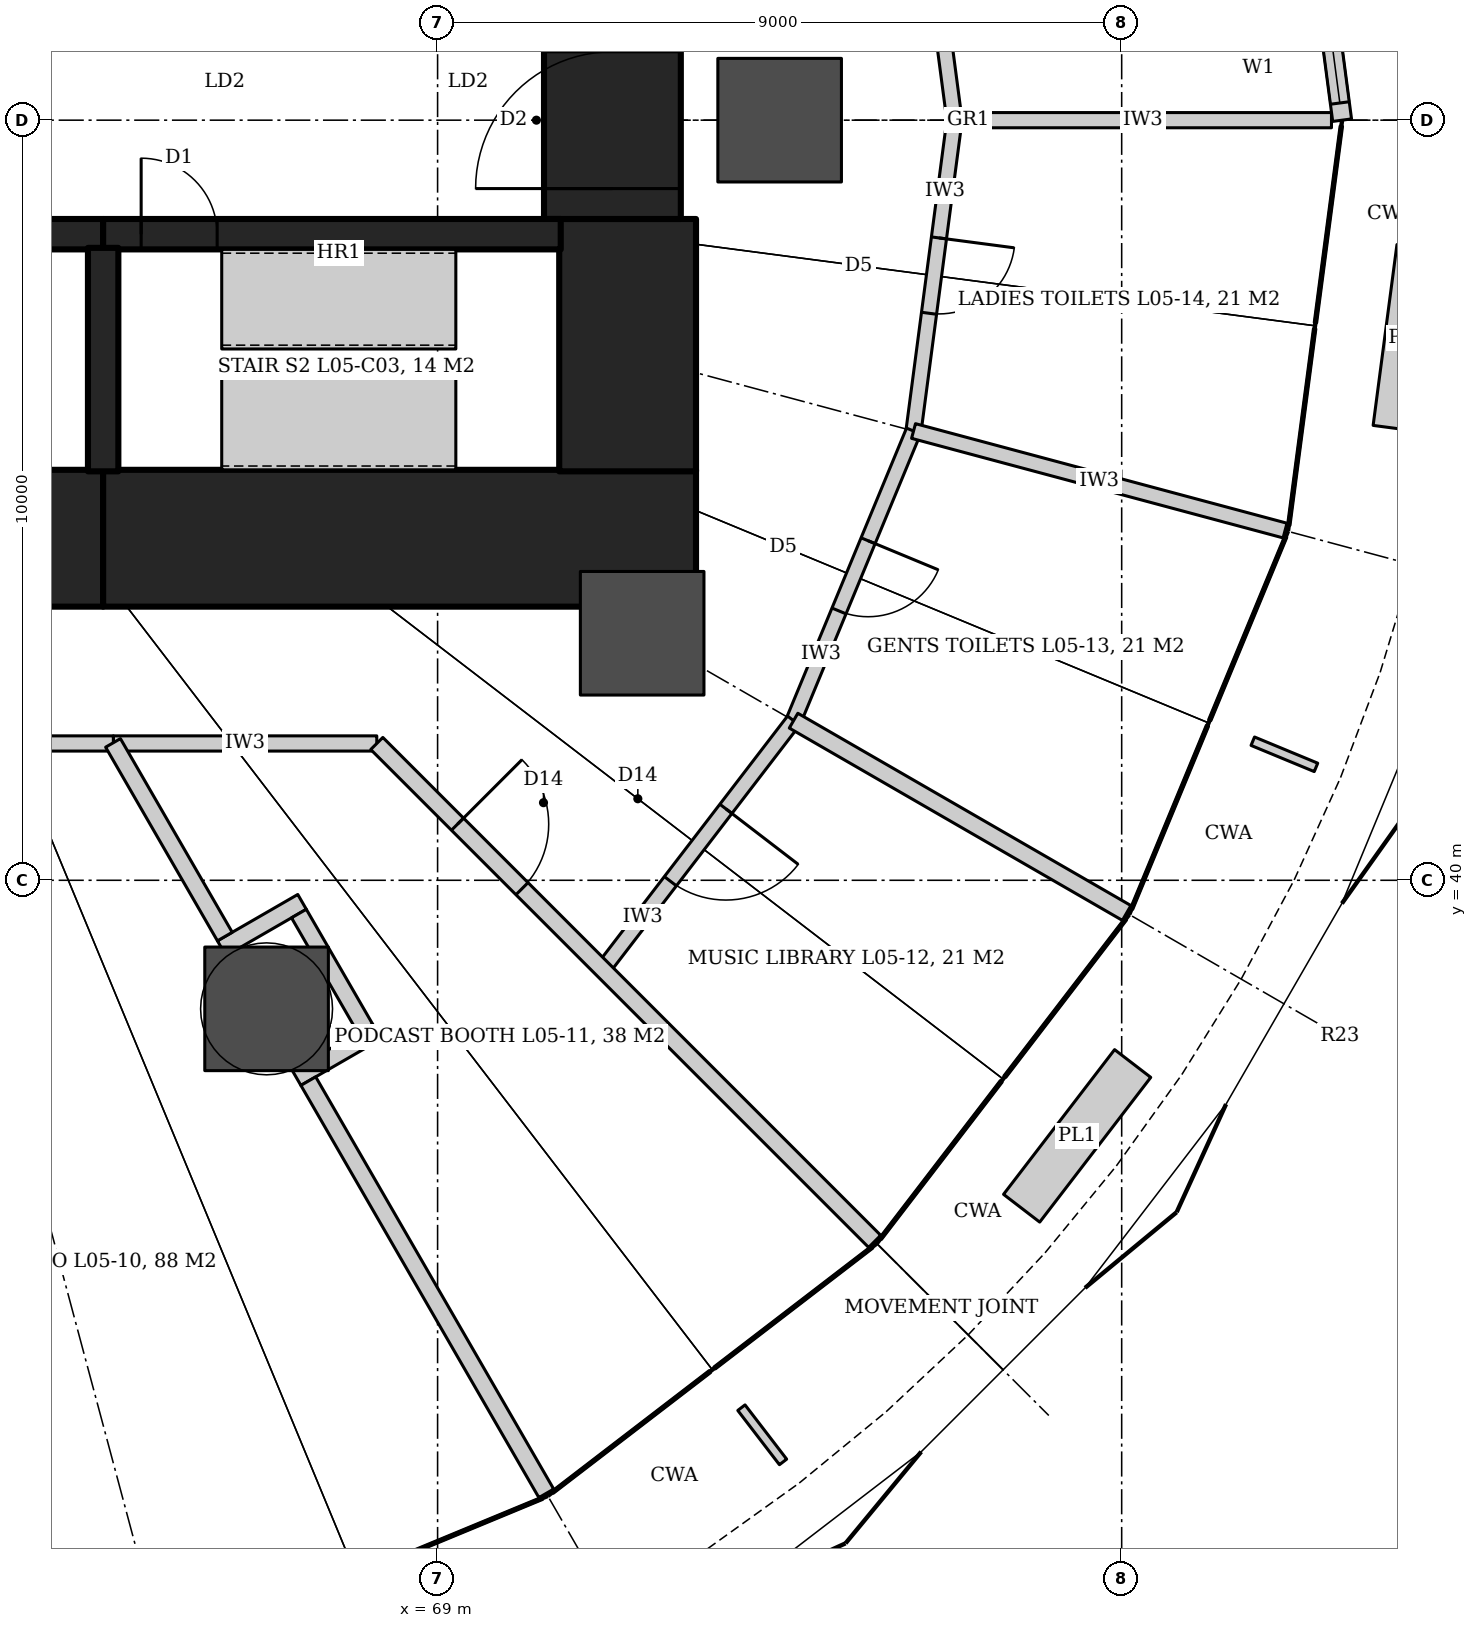
"""IFC4 building model, lengths in metres.
Left out: names, types, materials, properties, quantities, classifications, styles, units other than length and angle.
Written with IfcOpenShell. Run it as: python <this file> out.ifc"""

import sys

from ifc_helpers import new_model, si_unit, direction, frame, frame_2d, origin, origin_2d, place, context, subcontext, project, spatial, rectangle, hollow_circle, extrude, element, fill, save


model = new_model("IFC4")
c1 = context("Model", 3, precision=1e-05, world=origin(), true_north=direction((0.0, 1.0)))
c2 = subcontext(c1, "Body", "Model", "MODEL_VIEW")
j1 = project(units=[si_unit("LENGTHUNIT", "METRE"), si_unit("PLANEANGLEUNIT", "RADIAN")], contexts=[c1])
p1 = place(None, origin())
s1 = spatial("IfcSite", under=j1, at=p1, CompositionType="ELEMENT")
p2 = place(p1, origin())
s2 = spatial("IfcBuilding", under=s1, at=p2, CompositionType="ELEMENT")
p3 = place(p2, frame((0.0, 0.0, 30.2)))
s3 = spatial("IfcBuildingStorey", under=s2, at=p3, CompositionType="ELEMENT", Elevation=30.2)
p4 = place(p3, frame((55.4, 44.5, 0.0), z_axis=(0.0, 0.0, 1.0), x_axis=(1.0, 0.0, 0.0)))
e1 = element("IfcWall", 1, at=p4, inside=s3, PredefinedType="SHEAR", context=c2, shape_type="SweptSolid", body=[
    extrude(rectangle(XDim=9.2, YDim=1.8, at=frame_2d((4.6, 0.0))), origin(), (0.0, 0.0, 1.0), 4.2),
])
p5 = place(p3, frame((64.6, 44.5, 0.0), z_axis=(0.0, 0.0, 1.0), x_axis=(1.0, 0.0, 0.0)))
e2 = element("IfcWall", 2, at=p5, inside=s3, PredefinedType="SHEAR", context=c2, shape_type="SweptSolid", body=[
    extrude(rectangle(XDim=7.8, YDim=1.8, at=frame_2d((3.9, 0.0))), origin(), (0.0, 0.0, 1.0), 4.2),
])
p6 = place(p3, frame((71.5, 45.38, 0.0), z_axis=(0.0, 0.0, 1.0), x_axis=(0.0, 1.0, 0.0)))
e3 = element("IfcWall", 3, at=p6, inside=s3, PredefinedType="SHEAR", context=c2, shape_type="SweptSolid", body=[
    extrude(rectangle(XDim=3.32, YDim=1.8, at=frame_2d((1.66, 0.0))), origin(), (0.0, 0.0, 1.0), 4.2),
])
p7 = place(p3, frame((71.3, 48.7, 0.0), z_axis=(0.0, 0.0, 1.0), x_axis=(0.0, 1.0, 0.0)))
e4 = element("IfcWall", 4, at=p7, inside=s3, PredefinedType="SHEAR", context=c2, shape_type="SweptSolid", body=[
    extrude(rectangle(XDim=2.6, YDim=1.8, at=frame_2d((1.3, 0.0))), origin(), (0.0, 0.0, 1.0), 4.2),
])
p8 = place(p7, frame((0.4, 0.0, 0.0)))
e5 = element("IfcOpeningElement", 5, at=p8, cuts=e4, PredefinedType="OPENING", context=c2, shape_type="SweptSolid", body=[
    extrude(rectangle(XDim=1.8, YDim=2.1, at=frame_2d((0.9, 1.05))), frame((0.0, 0.91, 0.0), z_axis=(0.0, -1.0, 0.0), x_axis=(1.0, 0.0, 0.0)), (0.0, 0.0, 1.0), 1.82),
])
p9 = place(p3, frame((55.4, 48.5, 0.0), z_axis=(0.0, 0.0, 1.0), x_axis=(1.0, 0.0, 0.0)))
e6 = element("IfcWall", 6, at=p9, inside=s3, PredefinedType="SHEAR", context=c2, shape_type="SweptSolid", body=[
    extrude(rectangle(XDim=9.2, YDim=0.4, at=frame_2d((4.6, 0.0))), origin(), (0.0, 0.0, 1.0), 4.2),
])
p10 = place(p3, frame((64.6, 48.5, 0.0), z_axis=(0.0, 0.0, 1.0), x_axis=(1.0, 0.0, 0.0)))
e7 = element("IfcWall", 7, at=p10, inside=s3, PredefinedType="SHEAR", context=c2, shape_type="SweptSolid", body=[
    extrude(rectangle(XDim=6.02, YDim=0.4, at=frame_2d((3.01, 0.0))), origin(), (0.0, 0.0, 1.0), 4.2),
])
p11 = place(p10, frame((0.5, 0.0, 0.0)))
e8 = element("IfcOpeningElement", 8, at=p11, cuts=e7, PredefinedType="OPENING", context=c2, shape_type="SweptSolid", body=[
    extrude(rectangle(XDim=1.0, YDim=2.1, at=frame_2d((0.5, 1.05))), frame((0.0, 0.21, 0.0), z_axis=(0.0, -1.0, 0.0), x_axis=(1.0, 0.0, 0.0)), (0.0, 0.0, 1.0), 0.42),
])
p12 = place(p3, frame((64.6, 48.32, 0.0), z_axis=(0.0, 0.0, 1.0), x_axis=(0.0, -1.0, 0.0)))
e9 = element("IfcWall", 9, at=p12, inside=s3, PredefinedType="SHEAR", context=c2, shape_type="SweptSolid", body=[
    extrude(rectangle(XDim=2.94, YDim=0.4, at=frame_2d((1.47, 0.0))), origin(), (0.0, 0.0, 1.0), 4.2),
])
for number, where, z_axis, x_axis in (
    (10, (73.5, 50.0, 0.0), (0.0, 0.0, 1.0), (1.0, 0.0, 0.0)),
    (11, (66.75, 38.309, 0.0), (0.0, 0.0, 1.0), (1.0, 0.0, 0.0)),
    (12, (71.691, 43.25, 0.0), (0.0, 0.0, 1.0), (1.0, 0.0, 0.0)),
):
    element("IfcColumn", number, at=place(p3, frame(where, z_axis=z_axis, x_axis=x_axis)), inside=s3, PredefinedType="COLUMN", context=c2, shape_type="SweptSolid", body=[
        extrude(hollow_circle(Radius=0.813, WallThickness=0.08, at=origin_2d()), origin(), (0.0, 0.0, 1.0), 4.2),
    ])
p13 = place(p3, frame((75.262, 54.089, 0.0), z_axis=(0.0, 0.0, 1.0), x_axis=(0.130515758099, -0.991446234996, 0.0)))
e13 = element("IfcWall", 13, at=p13, inside=s3, PredefinedType="PARTITIONING", context=c2, shape_type="SweptSolid", body=[
    extrude(rectangle(XDim=4.125, YDim=0.2, at=frame_2d((2.062, 0.0))), origin(), (0.0, 0.0, 1.0), 3.04),
])
p14 = place(p3, frame((75.8, 50.0, 0.0), z_axis=(0.0, 0.0, 1.0), x_axis=(-0.130515758099, -0.991446234996, 0.0)))
e14 = element("IfcWall", 14, at=p14, inside=s3, PredefinedType="PARTITIONING", context=c2, shape_type="SweptSolid", body=[
    extrude(rectangle(XDim=4.125, YDim=0.2, at=frame_2d((2.062, 0.0))), origin(), (0.0, 0.0, 1.0), 3.04),
])
p15 = place(p14, frame((1.562, 0.0, 0.0)))
e15 = element("IfcOpeningElement", 15, at=p15, cuts=e14, PredefinedType="OPENING", context=c2, shape_type="SweptSolid", body=[
    extrude(rectangle(XDim=1.0, YDim=2.1, at=frame_2d((0.5, 1.05))), frame((0.0, 0.11, 0.0), z_axis=(0.0, -1.0, 0.0), x_axis=(1.0, 0.0, 0.0)), (0.0, 0.0, 1.0), 0.22),
])
p16 = place(p3, frame((75.262, 45.911, 0.0), z_axis=(0.0, 0.0, 1.0), x_axis=(-0.382731667114, -0.923859551549, 0.0)))
e16 = element("IfcWall", 16, at=p16, inside=s3, PredefinedType="PARTITIONING", context=c2, shape_type="SweptSolid", body=[
    extrude(rectangle(XDim=4.125, YDim=0.2, at=frame_2d((2.062, 0.0))), origin(), (0.0, 0.0, 1.0), 3.04),
])
p17 = place(p16, frame((1.562, 0.0, 0.0)))
e17 = element("IfcOpeningElement", 17, at=p17, cuts=e16, PredefinedType="OPENING", context=c2, shape_type="SweptSolid", body=[
    extrude(rectangle(XDim=1.0, YDim=2.1, at=frame_2d((0.5, 1.05))), frame((0.0, 0.11, 0.0), z_axis=(0.0, -1.0, 0.0), x_axis=(1.0, 0.0, 0.0)), (0.0, 0.0, 1.0), 0.22),
])
p18 = place(p3, frame((73.683, 42.1, 0.0), z_axis=(0.0, 0.0, 1.0), x_axis=(-0.608714823874, -0.793389099494, 0.0)))
e18 = element("IfcWall", 18, at=p18, inside=s3, PredefinedType="PARTITIONING", context=c2, shape_type="SweptSolid", body=[
    extrude(rectangle(XDim=4.125, YDim=0.2, at=frame_2d((2.062, 0.0))), origin(), (0.0, 0.0, 1.0), 3.04),
])
p19 = place(p18, frame((1.462, 0.0, 0.0)))
e19 = element("IfcOpeningElement", 19, at=p19, cuts=e18, PredefinedType="OPENING", context=c2, shape_type="SweptSolid", body=[
    extrude(rectangle(XDim=1.2, YDim=2.4, at=frame_2d((0.6, 1.2))), frame((0.0, 0.11, 0.0), z_axis=(0.0, -1.0, 0.0), x_axis=(1.0, 0.0, 0.0)), (0.0, 0.0, 1.0), 0.22),
])
p20 = place(p3, frame((68.2, 41.8, 0.0), z_axis=(0.0, 0.0, 1.0), x_axis=(-1.0, 0.0, 0.0)))
e20 = element("IfcWall", 20, at=p20, inside=s3, PredefinedType="PARTITIONING", context=c2, shape_type="SweptSolid", body=[
    extrude(rectangle(XDim=3.466, YDim=0.2, at=frame_2d((1.733, 0.0))), origin(), (0.0, 0.0, 1.0), 3.04),
])
p21 = place(p3, frame((64.734, 41.8, 0.0), z_axis=(0.0, 0.0, 1.0), x_axis=(-1.0, 0.0, 0.0)))
e21 = element("IfcWall", 21, at=p21, inside=s3, PredefinedType="PARTITIONING", context=c2, shape_type="SweptSolid", body=[
    extrude(rectangle(XDim=4.734, YDim=0.2, at=frame_2d((2.367, 0.0))), origin(), (0.0, 0.0, 1.0), 3.04),
])
p22 = place(p21, frame((1.467, 0.0, 0.0)))
e22 = element("IfcOpeningElement", 22, at=p22, cuts=e21, PredefinedType="OPENING", context=c2, shape_type="SweptSolid", body=[
    extrude(rectangle(XDim=1.8, YDim=2.7, at=frame_2d((0.9, 1.35))), frame((0.0, 0.11, 0.0), z_axis=(0.0, -1.0, 0.0), x_axis=(1.0, 0.0, 0.0)), (0.0, 0.0, 1.0), 0.22),
])
p23 = place(p3, frame((75.8, 50.0, 0.0), z_axis=(0.0, 0.0, 1.0), x_axis=(1.0, 0.0, 0.0)))
e23 = element("IfcWall", 23, at=p23, inside=s3, PredefinedType="PARTITIONING", context=c2, shape_type="SweptSolid", body=[
    extrude(rectangle(XDim=4.96, YDim=0.2, at=frame_2d((2.48, 0.0))), origin(), (0.0, 0.0, 1.0), 3.04),
])
p24 = place(p3, frame((66.16, 39.106, 0.0), z_axis=(0.0, 0.0, 1.0), x_axis=(0.866055662726, 0.499947586314, 0.0)))
e24 = element("IfcWall", 24, at=p24, inside=s3, PredefinedType="PARTITIONING", context=c2, shape_type="SweptSolid", body=[
    extrude(rectangle(XDim=1.22, YDim=0.225, at=frame_2d((0.61, 0.0))), origin(), (0.0, 0.0, 1.0), 3.02),
])
p25 = place(p3, frame((67.145, 37.399, 0.0), z_axis=(0.0, 0.0, 1.0), x_axis=(0.866019052629, 0.500011000363, 0.0)))
e25 = element("IfcWall", 25, at=p25, inside=s3, PredefinedType="PARTITIONING", context=c2, shape_type="SweptSolid", body=[
    extrude(rectangle(XDim=1.221, YDim=0.225, at=frame_2d((0.61, 0.0))), origin(), (0.0, 0.0, 1.0), 3.02),
])
p26 = place(p3, frame((67.176, 39.562, 0.0), z_axis=(0.0, 0.0, 1.0), x_axis=(0.499988720078, -0.866031916153, 0.0)))
e26 = element("IfcWall", 26, at=p26, inside=s3, PredefinedType="PARTITIONING", context=c2, shape_type="SweptSolid", body=[
    extrude(rectangle(XDim=1.746, YDim=0.225, at=frame_2d((0.873, 0.0))), origin(), (0.0, 0.0, 1.0), 3.02),
])
p27 = place(p3, frame((64.73, 41.807, 0.0), z_axis=(0.0, 0.0, 1.0), x_axis=(0.49998584623, -0.866033575313, 0.0)))
e27 = element("IfcWall", 27, at=p27, inside=s3, PredefinedType="PARTITIONING", context=c2, shape_type="SweptSolid", body=[
    extrude(rectangle(XDim=2.942, YDim=0.225, at=frame_2d((1.471, 0.0))), origin(), (0.0, 0.0, 1.0), 3.04),
])
p28 = place(p3, frame((67.299, 37.358, 0.0), z_axis=(0.0, 0.0, 1.0), x_axis=(0.499980071345, -0.866036909293, 0.0)))
e28 = element("IfcWall", 28, at=p28, inside=s3, PredefinedType="PARTITIONING", context=c2, shape_type="SweptSolid", body=[
    extrude(rectangle(XDim=6.262, YDim=0.225, at=frame_2d((3.131, 0.0))), origin(), (0.0, 0.0, 1.0), 3.04),
])
p29 = place(p3, frame((68.2, 41.8, 0.0), z_axis=(0.0, 0.0, 1.0), x_axis=(0.707106781187, -0.707106781187, 0.0)))
e29 = element("IfcWall", 29, at=p29, inside=s3, PredefinedType="PARTITIONING", context=c2, shape_type="SweptSolid", body=[
    extrude(rectangle(XDim=9.263, YDim=0.225, at=frame_2d((4.632, 0.0))), origin(), (0.0, 0.0, 1.0), 3.02),
])
p30 = place(p29, frame((1.502, 0.0, 0.0)))
e30 = element("IfcOpeningElement", 30, at=p30, cuts=e29, PredefinedType="OPENING", context=c2, shape_type="SweptSolid", body=[
    extrude(rectangle(XDim=1.2, YDim=2.4, at=frame_2d((0.6, 1.2))), frame((0.0, 0.123, 0.0), z_axis=(0.0, -1.0, 0.0), x_axis=(1.0, 0.0, 0.0)), (0.0, 0.0, 1.0), 0.245),
])
p31 = place(p3, frame((73.683, 42.1, 0.0), z_axis=(0.0, 0.0, 1.0), x_axis=(0.866022478443, -0.500005066806, 0.0)))
e31 = element("IfcWall", 31, at=p31, inside=s3, PredefinedType="PARTITIONING", context=c2, shape_type="SweptSolid", body=[
    extrude(rectangle(XDim=5.06, YDim=0.225, at=frame_2d((2.53, 0.0))), origin(), (0.0, 0.0, 1.0), 3.04),
])
p32 = place(p3, frame((75.262, 45.911, 0.0), z_axis=(0.0, 0.0, 1.0), x_axis=(0.965926729572, -0.258815673981, 0.0)))
e32 = element("IfcWall", 32, at=p32, inside=s3, PredefinedType="PARTITIONING", context=c2, shape_type="SweptSolid", body=[
    extrude(rectangle(XDim=5.06, YDim=0.2, at=frame_2d((2.53, 0.0))), origin(), (0.0, 0.0, 1.0), 3.04),
])
p33 = place(p3, frame((80.9, 50.0, 0.0), z_axis=(0.0, 0.0, 1.0), x_axis=(-0.130525119492, 0.991445002601, 0.0)))
e33 = element("IfcWall", 33, at=p33, inside=s3, PredefinedType="SOLIDWALL", context=c2, shape_type="SweptSolid", body=[
    extrude(rectangle(XDim=5.456, YDim=0.25, at=frame_2d((2.728, 0.0))), origin(), (0.0, 0.0, 1.0), 4.04),
])
p34 = place(p33, frame((1.828, 0.0, 0.0)))
e34 = element("IfcOpeningElement", 34, at=p34, cuts=e33, PredefinedType="OPENING", context=c2, shape_type="SweptSolid", body=[
    extrude(rectangle(XDim=1.8, YDim=2.4, at=frame_2d((0.9, 1.2))), frame((0.0, 0.135, 0.0), z_axis=(0.0, -1.0, 0.0), x_axis=(1.0, 0.0, 0.0)), (0.0, 0.0, 1.0), 0.27),
])
p35 = place(p33, frame((0.228, 0.0, 0.0)))
e35 = element("IfcOpeningElement", 35, at=p35, cuts=e33, PredefinedType="OPENING", context=c2, shape_type="SweptSolid", body=[
    extrude(rectangle(XDim=1.2, YDim=2.4, at=frame_2d((0.6, 1.2))), frame((0.0, 0.135, 0.0), z_axis=(0.0, -1.0, 0.0), x_axis=(1.0, 0.0, 0.0)), (0.0, 0.0, 1.0), 0.27),
])
p36 = place(p33, frame((4.028, 0.0, 0.0)))
e36 = element("IfcOpeningElement", 36, at=p36, cuts=e33, PredefinedType="OPENING", context=c2, shape_type="SweptSolid", body=[
    extrude(rectangle(XDim=1.2, YDim=2.4, at=frame_2d((0.6, 1.2))), frame((0.0, 0.135, 0.0), z_axis=(0.0, -1.0, 0.0), x_axis=(1.0, 0.0, 0.0)), (0.0, 0.0, 1.0), 0.27),
])
p37 = place(p30, origin())
e37 = element("IfcDoor", 37, at=p37, inside=s3, OperationType="SINGLE_SWING_LEFT", PredefinedType="DOOR", context=c2, shape_type="SweptSolid", body=[
    extrude(rectangle(XDim=1.2, YDim=2.4, at=frame_2d((0.6, 1.2))), frame((0.0, 0.025, 0.0), z_axis=(0.0, -1.0, 0.0), x_axis=(1.0, 0.0, 0.0)), (0.0, 0.0, 1.0), 0.05),
])
fill(e30, e37)
p38 = place(p19, origin())
e38 = element("IfcDoor", 38, at=p38, inside=s3, OperationType="SINGLE_SWING_LEFT", PredefinedType="DOOR", context=c2, shape_type="SweptSolid", body=[
    extrude(rectangle(XDim=1.2, YDim=2.4, at=frame_2d((0.6, 1.2))), frame((0.0, 0.025, 0.0), z_axis=(0.0, -1.0, 0.0), x_axis=(1.0, 0.0, 0.0)), (0.0, 0.0, 1.0), 0.05),
])
fill(e19, e38)
p39 = place(p17, origin())
e39 = element("IfcDoor", 39, at=p39, inside=s3, OperationType="SINGLE_SWING_LEFT", PredefinedType="DOOR", context=c2, shape_type="SweptSolid", body=[
    extrude(rectangle(XDim=1.0, YDim=2.1, at=frame_2d((0.5, 1.05))), frame((0.0, 0.025, 0.0), z_axis=(0.0, -1.0, 0.0), x_axis=(1.0, 0.0, 0.0)), (0.0, 0.0, 1.0), 0.05),
])
fill(e17, e39)
p40 = place(p15, origin())
e40 = element("IfcDoor", 40, at=p40, inside=s3, OperationType="SINGLE_SWING_LEFT", PredefinedType="DOOR", context=c2, shape_type="SweptSolid", body=[
    extrude(rectangle(XDim=1.0, YDim=2.1, at=frame_2d((0.5, 1.05))), frame((0.0, 0.025, 0.0), z_axis=(0.0, -1.0, 0.0), x_axis=(1.0, 0.0, 0.0)), (0.0, 0.0, 1.0), 0.05),
])
fill(e15, e40)
p41 = place(p35, origin())
e41 = element("IfcWindow", 41, at=p41, inside=s3, PartitioningType="SINGLE_PANEL", PredefinedType="WINDOW", context=c2, shape_type="SweptSolid", body=[
    extrude(rectangle(XDim=1.2, YDim=2.4, at=frame_2d((0.6, 1.2))), frame((0.0, 0.03, 0.0), z_axis=(0.0, -1.0, 0.0), x_axis=(1.0, 0.0, 0.0)), (0.0, 0.0, 1.0), 0.06),
])
fill(e35, e41)
p42 = place(p11, origin())
e42 = element("IfcDoor", 42, at=p42, inside=s3, OperationType="SINGLE_SWING_LEFT", PredefinedType="DOOR", context=c2, shape_type="SweptSolid", body=[
    extrude(rectangle(XDim=1.0, YDim=2.1, at=frame_2d((0.5, 1.05))), frame((0.0, 0.025, 0.0), z_axis=(0.0, -1.0, 0.0), x_axis=(1.0, 0.0, 0.0)), (0.0, 0.0, 1.0), 0.05),
])
fill(e8, e42)
p43 = place(p8, origin())
e43 = element("IfcDoor", 43, at=p43, inside=s3, OperationType="DOUBLE_DOOR_DOUBLE_SWING", PredefinedType="DOOR", context=c2, shape_type="SweptSolid", body=[
    extrude(rectangle(XDim=1.8, YDim=2.1, at=frame_2d((0.9, 1.05))), frame((0.0, 0.025, 0.0), z_axis=(0.0, -1.0, 0.0), x_axis=(1.0, 0.0, 0.0)), (0.0, 0.0, 1.0), 0.05),
])
fill(e5, e43)
save(model, sys.argv[1])
